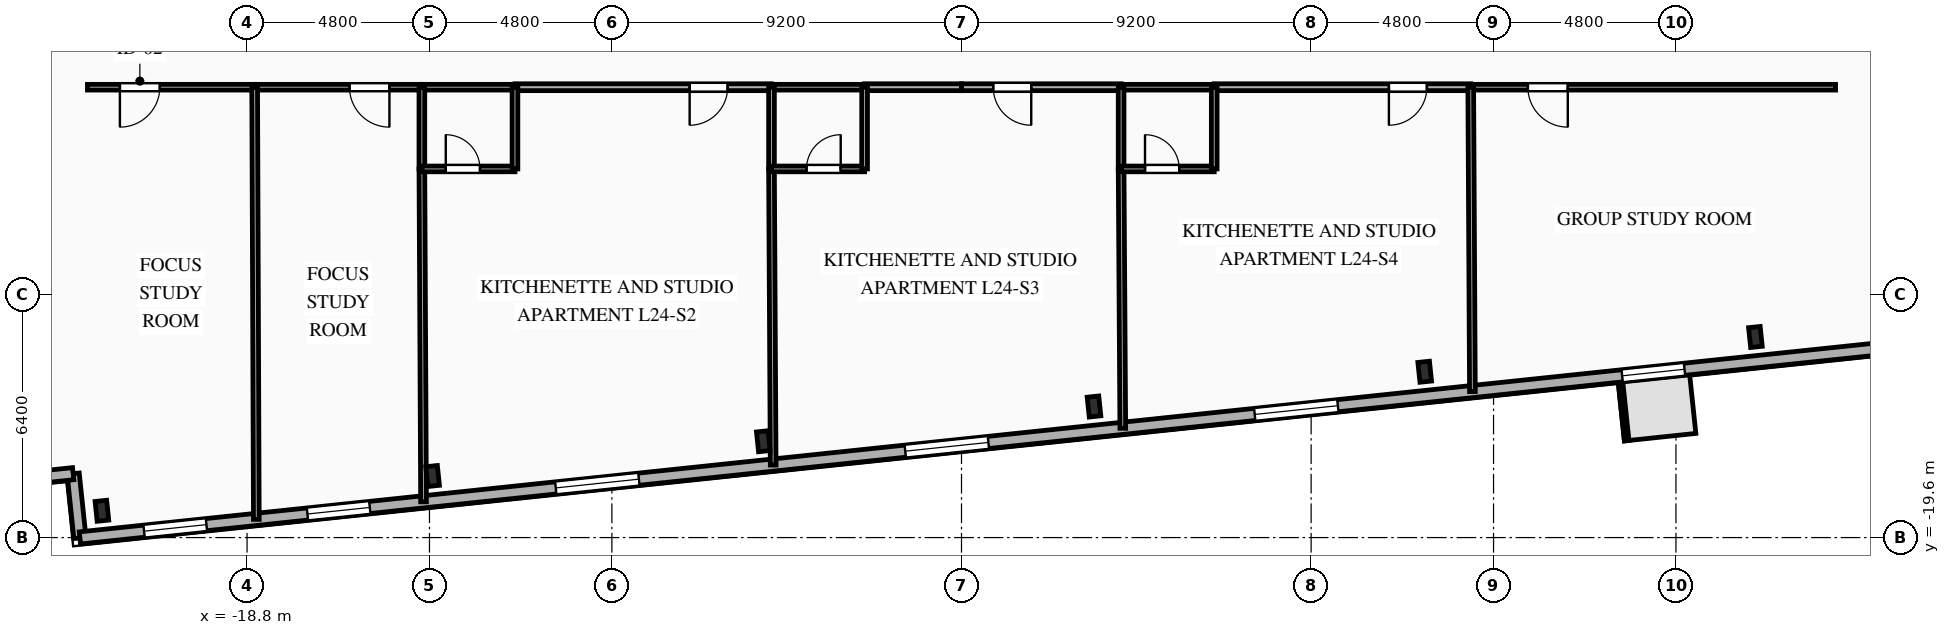
"""IFC4 building model, lengths in metres.
Left out: names, types, materials, properties, quantities, classifications, styles, units other than length and angle.
Written with IfcOpenShell. Run it as: python <this file> out.ifc"""

import sys

from ifc_helpers import new_model, si_unit, direction, frame, frame_2d, origin, origin_2d, place, context, subcontext, project, spatial, rectangle, i_section, extrude, element, fill, save


model = new_model("IFC4")
c1 = context("Model", 3, precision=1e-05, world=origin(), true_north=direction((0.0, 1.0)))
c2 = subcontext(c1, "Body", "Model", "MODEL_VIEW")
j1 = project(units=[si_unit("LENGTHUNIT", "METRE"), si_unit("PLANEANGLEUNIT", "RADIAN")], contexts=[c1])
p1 = place(None, origin())
s1 = spatial("IfcSite", under=j1, at=p1, CompositionType="ELEMENT")
p2 = place(p1, origin())
s2 = spatial("IfcBuilding", under=s1, at=p2, CompositionType="ELEMENT")
p3 = place(p2, frame((0.0, 0.0, 89.05)))
s3 = spatial("IfcBuildingStorey", under=s2, at=p3, CompositionType="ELEMENT", Elevation=89.05)
for number, where, z_axis, x_axis in (
    (1, (-22.619, -18.895, 0.0), (0.0, 0.0, 1.0), (0.995, 0.105, 0.0)),
    (2, (-13.917, -17.98, 0.0), (0.0, 0.0, 1.0), (0.995, 0.105, 0.0)),
    (3, (-5.215, -17.066, 0.0), (0.0, 0.0, 1.0), (0.995, 0.105, 0.0)),
    (4, (3.487, -16.151, 0.0), (0.0, 0.0, 1.0), (0.995, 0.105, 0.0)),
    (5, (12.189, -15.237, 0.0), (0.0, 0.0, 1.0), (0.995, 0.105, 0.0)),
    (6, (20.891, -14.322, 0.0), (0.0, 0.0, 1.0), (0.995, 0.105, 0.0)),
):
    element("IfcColumn", number, at=place(p3, frame(where, z_axis=z_axis, x_axis=x_axis)), inside=s3, PredefinedType="COLUMN", context=c2, shape_type="SweptSolid", body=[
        extrude(i_section(OverallWidth=0.306, OverallDepth=0.524, WebThickness=0.021, FlangeThickness=0.04, FilletRadius=0.027, at=origin_2d()), origin(), (0.0, 0.0, 1.0), 3.35),
    ])
for number, where, z_axis, x_axis in (
    (7, (-23.198, -19.609, 0.0), (0.0, 0.0, 1.0), (-0.105, 0.995, 0.0)),
    (8, (-23.376, -17.919, 0.0), (0.0, 0.0, 1.0), (-0.995, -0.105, 0.0)),
):
    element("IfcWall", number, at=place(p3, frame(where, z_axis=z_axis, x_axis=x_axis)), inside=s3, PredefinedType="SOLIDWALL", context=c2, shape_type="SweptSolid", body=[
        extrude(rectangle(XDim=1.7, YDim=0.32, at=frame_2d((0.85, 0.0))), origin(), (0.0, 0.0, 1.0), 3.045),
    ])
p4 = place(p3, frame((30.307, -13.986, 0.0), z_axis=(0.0, 0.0, 1.0), x_axis=(-0.994521628355, -0.104531003701, 0.0)))
e9 = element("IfcWall", 9, at=p4, inside=s3, PredefinedType="SOLIDWALL", context=c2, shape_type="SweptSolid", body=[
    extrude(rectangle(XDim=53.8, YDim=0.32, at=frame_2d((26.9, 0.0))), origin(), (0.0, 0.0, 1.0), 3.045),
])
p5 = place(p4, frame((11.344, 0.0, 0.85)))
e10 = element("IfcOpeningElement", 10, at=p5, cuts=e9, PredefinedType="OPENING", context=c2, shape_type="SweptSolid", body=[
    extrude(rectangle(XDim=1.65, YDim=1.85, at=frame_2d((0.825, 0.925))), frame((0.0, 0.17, 0.0), z_axis=(0.0, -1.0, 0.0), x_axis=(1.0, 0.0, 0.0)), (0.0, 0.0, 1.0), 0.34),
])
p6 = place(p4, frame((20.516, 0.0, 0.85)))
e11 = element("IfcOpeningElement", 11, at=p6, cuts=e9, PredefinedType="OPENING", context=c2, shape_type="SweptSolid", body=[
    extrude(rectangle(XDim=2.2, YDim=1.85, at=frame_2d((1.1, 0.925))), frame((0.0, 0.17, 0.0), z_axis=(0.0, -1.0, 0.0), x_axis=(1.0, 0.0, 0.0)), (0.0, 0.0, 1.0), 0.34),
])
p7 = place(p4, frame((29.763, 0.0, 0.85)))
e12 = element("IfcOpeningElement", 12, at=p7, cuts=e9, PredefinedType="OPENING", context=c2, shape_type="SweptSolid", body=[
    extrude(rectangle(XDim=2.2, YDim=1.85, at=frame_2d((1.1, 0.925))), frame((0.0, 0.17, 0.0), z_axis=(0.0, -1.0, 0.0), x_axis=(1.0, 0.0, 0.0)), (0.0, 0.0, 1.0), 0.34),
])
p8 = place(p4, frame((39.01, 0.0, 0.85)))
e13 = element("IfcOpeningElement", 13, at=p8, cuts=e9, PredefinedType="OPENING", context=c2, shape_type="SweptSolid", body=[
    extrude(rectangle(XDim=2.2, YDim=1.85, at=frame_2d((1.1, 0.925))), frame((0.0, 0.17, 0.0), z_axis=(0.0, -1.0, 0.0), x_axis=(1.0, 0.0, 0.0)), (0.0, 0.0, 1.0), 0.34),
])
p9 = place(p4, frame((46.13, 0.0, 0.85)))
e14 = element("IfcOpeningElement", 14, at=p9, cuts=e9, PredefinedType="OPENING", context=c2, shape_type="SweptSolid", body=[
    extrude(rectangle(XDim=1.65, YDim=1.85, at=frame_2d((0.825, 0.925))), frame((0.0, 0.17, 0.0), z_axis=(0.0, -1.0, 0.0), x_axis=(1.0, 0.0, 0.0)), (0.0, 0.0, 1.0), 0.34),
])
p10 = place(p4, frame((50.453, 0.0, 0.85)))
e15 = element("IfcOpeningElement", 15, at=p10, cuts=e9, PredefinedType="OPENING", context=c2, shape_type="SweptSolid", body=[
    extrude(rectangle(XDim=1.65, YDim=1.85, at=frame_2d((0.825, 0.925))), frame((0.0, 0.17, 0.0), z_axis=(0.0, -1.0, 0.0), x_axis=(1.0, 0.0, 0.0)), (0.0, 0.0, 1.0), 0.34),
])
p11 = place(p3, frame((-18.6, -7.75, 0.0), z_axis=(0.0, 0.0, 1.0), x_axis=(-1.0, 0.0, 0.0)))
e16 = element("IfcWall", 16, at=p11, inside=s3, PredefinedType="PARTITIONING", context=c2, shape_type="SweptSolid", body=[
    extrude(rectangle(XDim=4.4, YDim=0.15, at=frame_2d((2.2, 0.0))), origin(), (0.0, 0.0, 1.0), 3.045),
])
p12 = place(p11, frame((2.496, 0.0, 0.0)))
e17 = element("IfcOpeningElement", 17, at=p12, cuts=e16, PredefinedType="OPENING", context=c2, shape_type="SweptSolid", body=[
    extrude(rectangle(XDim=1.05, YDim=2.15, at=frame_2d((0.525, 1.075))), frame((0.0, 0.085, 0.0), z_axis=(0.0, -1.0, 0.0), x_axis=(1.0, 0.0, 0.0)), (0.0, 0.0, 1.0), 0.17),
])
p13 = place(p3, frame((-14.2, -7.75, 0.0), z_axis=(0.0, 0.0, 1.0), x_axis=(-1.0, 0.0, 0.0)))
e18 = element("IfcWall", 18, at=p13, inside=s3, PredefinedType="PARTITIONING", context=c2, shape_type="SweptSolid", body=[
    extrude(rectangle(XDim=4.4, YDim=0.15, at=frame_2d((2.2, 0.0))), origin(), (0.0, 0.0, 1.0), 3.045),
])
p14 = place(p13, frame((0.854, 0.0, 0.0)))
e19 = element("IfcOpeningElement", 19, at=p14, cuts=e18, PredefinedType="OPENING", context=c2, shape_type="SweptSolid", body=[
    extrude(rectangle(XDim=1.05, YDim=2.15, at=frame_2d((0.525, 1.075))), frame((0.0, 0.085, 0.0), z_axis=(0.0, -1.0, 0.0), x_axis=(1.0, 0.0, 0.0)), (0.0, 0.0, 1.0), 0.17),
])
p15 = place(p3, frame((-5.0, -7.75, 0.0), z_axis=(0.0, 0.0, 1.0), x_axis=(-1.0, 0.0, 0.0)))
e20 = element("IfcWall", 20, at=p15, inside=s3, PredefinedType="PARTITIONING", context=c2, shape_type="SweptSolid", body=[
    extrude(rectangle(XDim=6.75, YDim=0.18, at=frame_2d((3.375, 0.0))), origin(), (0.0, 0.0, 1.0), 3.045),
])
p16 = place(p15, frame((1.154, 0.0, 0.0)))
e21 = element("IfcOpeningElement", 21, at=p16, cuts=e20, PredefinedType="OPENING", context=c2, shape_type="SweptSolid", body=[
    extrude(rectangle(XDim=1.0, YDim=2.15, at=frame_2d((0.5, 1.075))), frame((0.0, 0.1, 0.0), z_axis=(0.0, -1.0, 0.0), x_axis=(1.0, 0.0, 0.0)), (0.0, 0.0, 1.0), 0.2),
])
p17 = place(p3, frame((-11.75, -7.75, 0.0), z_axis=(0.0, 0.0, 1.0), x_axis=(-1.0, 0.0, 0.0)))
e22 = element("IfcWall", 22, at=p17, inside=s3, PredefinedType="PLUMBINGWALL", context=c2, shape_type="SweptSolid", body=[
    extrude(rectangle(XDim=2.45, YDim=0.15, at=frame_2d((1.225, 0.0))), origin(), (0.0, 0.0, 1.0), 3.045),
])
p18 = place(p3, frame((0.0, -7.75, 0.0), z_axis=(0.0, 0.0, 1.0), x_axis=(-1.0, 0.0, 0.0)))
e23 = element("IfcWall", 23, at=p18, inside=s3, PredefinedType="PARTITIONING", context=c2, shape_type="SweptSolid", body=[
    extrude(rectangle(XDim=2.55, YDim=0.18, at=frame_2d((1.275, 0.0))), origin(), (0.0, 0.0, 1.0), 3.045),
])
p19 = place(p3, frame((-2.55, -7.75, 0.0), z_axis=(0.0, 0.0, 1.0), x_axis=(-1.0, 0.0, 0.0)))
e24 = element("IfcWall", 24, at=p19, inside=s3, PredefinedType="PLUMBINGWALL", context=c2, shape_type="SweptSolid", body=[
    extrude(rectangle(XDim=2.45, YDim=0.15, at=frame_2d((1.225, 0.0))), origin(), (0.0, 0.0, 1.0), 3.045),
])
p20 = place(p3, frame((4.2, -7.75, 0.0), z_axis=(0.0, 0.0, 1.0), x_axis=(-1.0, 0.0, 0.0)))
e25 = element("IfcWall", 25, at=p20, inside=s3, PredefinedType="PARTITIONING", context=c2, shape_type="SweptSolid", body=[
    extrude(rectangle(XDim=4.2, YDim=0.18, at=frame_2d((2.1, 0.0))), origin(), (0.0, 0.0, 1.0), 3.045),
])
p21 = place(p20, frame((2.365, 0.0, 0.0)))
e26 = element("IfcOpeningElement", 26, at=p21, cuts=e25, PredefinedType="OPENING", context=c2, shape_type="SweptSolid", body=[
    extrude(rectangle(XDim=1.0, YDim=2.15, at=frame_2d((0.5, 1.075))), frame((0.0, 0.1, 0.0), z_axis=(0.0, -1.0, 0.0), x_axis=(1.0, 0.0, 0.0)), (0.0, 0.0, 1.0), 0.2),
])
p22 = place(p3, frame((13.4, -7.75, 0.0), z_axis=(0.0, 0.0, 1.0), x_axis=(-1.0, 0.0, 0.0)))
e27 = element("IfcWall", 27, at=p22, inside=s3, PredefinedType="PARTITIONING", context=c2, shape_type="SweptSolid", body=[
    extrude(rectangle(XDim=6.75, YDim=0.18, at=frame_2d((3.375, 0.0))), origin(), (0.0, 0.0, 1.0), 3.045),
])
p23 = place(p22, frame((1.154, 0.0, 0.0)))
e28 = element("IfcOpeningElement", 28, at=p23, cuts=e27, PredefinedType="OPENING", context=c2, shape_type="SweptSolid", body=[
    extrude(rectangle(XDim=1.0, YDim=2.15, at=frame_2d((0.5, 1.075))), frame((0.0, 0.1, 0.0), z_axis=(0.0, -1.0, 0.0), x_axis=(1.0, 0.0, 0.0)), (0.0, 0.0, 1.0), 0.2),
])
p24 = place(p3, frame((6.65, -7.75, 0.0), z_axis=(0.0, 0.0, 1.0), x_axis=(-1.0, 0.0, 0.0)))
e29 = element("IfcWall", 29, at=p24, inside=s3, PredefinedType="PLUMBINGWALL", context=c2, shape_type="SweptSolid", body=[
    extrude(rectangle(XDim=2.45, YDim=0.15, at=frame_2d((1.225, 0.0))), origin(), (0.0, 0.0, 1.0), 3.045),
])
p25 = place(p3, frame((23.0, -7.75, 0.0), z_axis=(0.0, 0.0, 1.0), x_axis=(-1.0, 0.0, 0.0)))
e30 = element("IfcWall", 30, at=p25, inside=s3, PredefinedType="PARTITIONING", context=c2, shape_type="SweptSolid", body=[
    extrude(rectangle(XDim=9.6, YDim=0.15, at=frame_2d((4.8, 0.0))), origin(), (0.0, 0.0, 1.0), 3.045),
])
p26 = place(p25, frame((7.046, 0.0, 0.0)))
e31 = element("IfcOpeningElement", 31, at=p26, cuts=e30, PredefinedType="OPENING", context=c2, shape_type="SweptSolid", body=[
    extrude(rectangle(XDim=1.05, YDim=2.15, at=frame_2d((0.525, 1.075))), frame((0.0, 0.085, 0.0), z_axis=(0.0, -1.0, 0.0), x_axis=(1.0, 0.0, 0.0)), (0.0, 0.0, 1.0), 0.17),
])
p27 = place(p3, frame((-18.6, -7.75, 0.0), z_axis=(0.0, 0.0, 1.0), x_axis=(0.003864456523, -0.99999253296, 0.0)))
e32 = element("IfcWall", 32, at=p27, inside=s3, PredefinedType="PARTITIONING", context=c2, shape_type="SweptSolid", body=[
    extrude(rectangle(XDim=11.372, YDim=0.15, at=frame_2d((5.686, 0.0))), origin(), (0.0, 0.0, 1.0), 3.045),
])
p28 = place(p3, frame((-14.2, -9.9, 0.0), z_axis=(0.0, 0.0, 1.0), x_axis=(0.005017078758, -0.999987414381, 0.0)))
e33 = element("IfcWall", 33, at=p28, inside=s3, PredefinedType="PARTITIONING", context=c2, shape_type="SweptSolid", body=[
    extrude(rectangle(XDim=8.759, YDim=0.15, at=frame_2d((4.379, 0.0))), origin(), (0.0, 0.0, 1.0), 3.045),
])
p29 = place(p3, frame((-14.2, -7.75, 0.0), z_axis=(0.0, 0.0, 1.0), x_axis=(0.0, -1.0, 0.0)))
e34 = element("IfcWall", 34, at=p29, inside=s3, PredefinedType="PLUMBINGWALL", context=c2, shape_type="SweptSolid", body=[
    extrude(rectangle(XDim=2.15, YDim=0.15, at=frame_2d((1.075, 0.0))), origin(), (0.0, 0.0, 1.0), 3.045),
])
p30 = place(p3, frame((-14.2, -9.9, 0.0), z_axis=(0.0, 0.0, 1.0), x_axis=(1.0, 0.0, 0.0)))
e35 = element("IfcWall", 35, at=p30, inside=s3, PredefinedType="PLUMBINGWALL", context=c2, shape_type="SweptSolid", body=[
    extrude(rectangle(XDim=2.45, YDim=0.15, at=frame_2d((1.225, 0.0))), origin(), (0.0, 0.0, 1.0), 3.045),
])
p31 = place(p30, frame((0.629, 0.0, 0.0)))
e36 = element("IfcOpeningElement", 36, at=p31, cuts=e35, PredefinedType="OPENING", context=c2, shape_type="SweptSolid", body=[
    extrude(rectangle(XDim=0.9, YDim=2.1, at=frame_2d((0.45, 1.05))), frame((0.0, 0.085, 0.0), z_axis=(0.0, -1.0, 0.0), x_axis=(1.0, 0.0, 0.0)), (0.0, 0.0, 1.0), 0.17),
])
p32 = place(p3, frame((-11.75, -9.9, 0.0), z_axis=(0.0, 0.0, 1.0), x_axis=(0.0, 1.0, 0.0)))
e37 = element("IfcWall", 37, at=p32, inside=s3, PredefinedType="PLUMBINGWALL", context=c2, shape_type="SweptSolid", body=[
    extrude(rectangle(XDim=2.15, YDim=0.15, at=frame_2d((1.075, 0.0))), origin(), (0.0, 0.0, 1.0), 3.045),
])
p33 = place(p3, frame((-5.0, -9.9, 0.0), z_axis=(0.0, 0.0, 1.0), x_axis=(0.005639538101, -0.999984097679, 0.0)))
e38 = element("IfcWall", 38, at=p33, inside=s3, PredefinedType="PARTITIONING", context=c2, shape_type="SweptSolid", body=[
    extrude(rectangle(XDim=7.792, YDim=0.15, at=frame_2d((3.896, 0.0))), origin(), (0.0, 0.0, 1.0), 3.045),
])
p34 = place(p3, frame((-5.0, -7.75, 0.0), z_axis=(0.0, 0.0, 1.0), x_axis=(0.0, -1.0, 0.0)))
e39 = element("IfcWall", 39, at=p34, inside=s3, PredefinedType="PLUMBINGWALL", context=c2, shape_type="SweptSolid", body=[
    extrude(rectangle(XDim=2.15, YDim=0.15, at=frame_2d((1.075, 0.0))), origin(), (0.0, 0.0, 1.0), 3.045),
])
p35 = place(p3, frame((-5.0, -9.9, 0.0), z_axis=(0.0, 0.0, 1.0), x_axis=(1.0, 0.0, 0.0)))
e40 = element("IfcWall", 40, at=p35, inside=s3, PredefinedType="PLUMBINGWALL", context=c2, shape_type="SweptSolid", body=[
    extrude(rectangle(XDim=2.45, YDim=0.15, at=frame_2d((1.225, 0.0))), origin(), (0.0, 0.0, 1.0), 3.045),
])
p36 = place(p35, frame((0.921, 0.0, 0.0)))
e41 = element("IfcOpeningElement", 41, at=p36, cuts=e40, PredefinedType="OPENING", context=c2, shape_type="SweptSolid", body=[
    extrude(rectangle(XDim=0.9, YDim=2.1, at=frame_2d((0.45, 1.05))), frame((0.0, 0.085, 0.0), z_axis=(0.0, -1.0, 0.0), x_axis=(1.0, 0.0, 0.0)), (0.0, 0.0, 1.0), 0.17),
])
p37 = place(p3, frame((-2.55, -9.9, 0.0), z_axis=(0.0, 0.0, 1.0), x_axis=(0.0, 1.0, 0.0)))
e42 = element("IfcWall", 42, at=p37, inside=s3, PredefinedType="PLUMBINGWALL", context=c2, shape_type="SweptSolid", body=[
    extrude(rectangle(XDim=2.15, YDim=0.15, at=frame_2d((1.075, 0.0))), origin(), (0.0, 0.0, 1.0), 3.045),
])
p38 = place(p3, frame((4.2, -9.9, 0.0), z_axis=(0.0, 0.0, 1.0), x_axis=(0.00643855591, -0.999979272284, 0.0)))
e43 = element("IfcWall", 43, at=p38, inside=s3, PredefinedType="PARTITIONING", context=c2, shape_type="SweptSolid", body=[
    extrude(rectangle(XDim=6.825, YDim=0.15, at=frame_2d((3.413, 0.0))), origin(), (0.0, 0.0, 1.0), 3.045),
])
p39 = place(p3, frame((4.2, -7.75, 0.0), z_axis=(0.0, 0.0, 1.0), x_axis=(0.0, -1.0, 0.0)))
e44 = element("IfcWall", 44, at=p39, inside=s3, PredefinedType="PLUMBINGWALL", context=c2, shape_type="SweptSolid", body=[
    extrude(rectangle(XDim=2.15, YDim=0.15, at=frame_2d((1.075, 0.0))), origin(), (0.0, 0.0, 1.0), 3.045),
])
p40 = place(p3, frame((4.2, -9.9, 0.0), z_axis=(0.0, 0.0, 1.0), x_axis=(1.0, 0.0, 0.0)))
e45 = element("IfcWall", 45, at=p40, inside=s3, PredefinedType="PLUMBINGWALL", context=c2, shape_type="SweptSolid", body=[
    extrude(rectangle(XDim=2.45, YDim=0.15, at=frame_2d((1.225, 0.0))), origin(), (0.0, 0.0, 1.0), 3.045),
])
p41 = place(p40, frame((0.629, 0.0, 0.0)))
e46 = element("IfcOpeningElement", 46, at=p41, cuts=e45, PredefinedType="OPENING", context=c2, shape_type="SweptSolid", body=[
    extrude(rectangle(XDim=0.9, YDim=2.1, at=frame_2d((0.45, 1.05))), frame((0.0, 0.085, 0.0), z_axis=(0.0, -1.0, 0.0), x_axis=(1.0, 0.0, 0.0)), (0.0, 0.0, 1.0), 0.17),
])
p42 = place(p3, frame((6.65, -9.9, 0.0), z_axis=(0.0, 0.0, 1.0), x_axis=(0.0, 1.0, 0.0)))
e47 = element("IfcWall", 47, at=p42, inside=s3, PredefinedType="PLUMBINGWALL", context=c2, shape_type="SweptSolid", body=[
    extrude(rectangle(XDim=2.15, YDim=0.15, at=frame_2d((1.075, 0.0))), origin(), (0.0, 0.0, 1.0), 3.045),
])
p43 = place(p3, frame((13.4, -7.75, 0.0), z_axis=(0.0, 0.0, 1.0), x_axis=(0.005487554946, -0.999984943257, 0.0)))
e48 = element("IfcWall", 48, at=p43, inside=s3, PredefinedType="PARTITIONING", context=c2, shape_type="SweptSolid", body=[
    extrude(rectangle(XDim=8.008, YDim=0.15, at=frame_2d((4.004, 0.0))), origin(), (0.0, 0.0, 1.0), 3.045),
])
p44 = place(p5, origin())
e49 = element("IfcWindow", 49, at=p44, inside=s3, PartitioningType="SINGLE_PANEL", PredefinedType="WINDOW", context=c2, shape_type="SweptSolid", body=[
    extrude(rectangle(XDim=1.65, YDim=1.85, at=frame_2d((0.825, 0.925))), frame((0.0, 0.03, 0.0), z_axis=(0.0, -1.0, 0.0), x_axis=(1.0, 0.0, 0.0)), (0.0, 0.0, 1.0), 0.06),
])
fill(e10, e49)
p45 = place(p6, origin())
e50 = element("IfcWindow", 50, at=p45, inside=s3, PartitioningType="SINGLE_PANEL", PredefinedType="WINDOW", context=c2, shape_type="SweptSolid", body=[
    extrude(rectangle(XDim=2.2, YDim=1.85, at=frame_2d((1.1, 0.925))), frame((0.0, 0.03, 0.0), z_axis=(0.0, -1.0, 0.0), x_axis=(1.0, 0.0, 0.0)), (0.0, 0.0, 1.0), 0.06),
])
fill(e11, e50)
p46 = place(p7, origin())
e51 = element("IfcWindow", 51, at=p46, inside=s3, PartitioningType="SINGLE_PANEL", PredefinedType="WINDOW", context=c2, shape_type="SweptSolid", body=[
    extrude(rectangle(XDim=2.2, YDim=1.85, at=frame_2d((1.1, 0.925))), frame((0.0, 0.03, 0.0), z_axis=(0.0, -1.0, 0.0), x_axis=(1.0, 0.0, 0.0)), (0.0, 0.0, 1.0), 0.06),
])
fill(e12, e51)
p47 = place(p8, origin())
e52 = element("IfcWindow", 52, at=p47, inside=s3, PartitioningType="SINGLE_PANEL", PredefinedType="WINDOW", context=c2, shape_type="SweptSolid", body=[
    extrude(rectangle(XDim=2.2, YDim=1.85, at=frame_2d((1.1, 0.925))), frame((0.0, 0.03, 0.0), z_axis=(0.0, -1.0, 0.0), x_axis=(1.0, 0.0, 0.0)), (0.0, 0.0, 1.0), 0.06),
])
fill(e13, e52)
p48 = place(p9, origin())
e53 = element("IfcWindow", 53, at=p48, inside=s3, PartitioningType="SINGLE_PANEL", PredefinedType="WINDOW", context=c2, shape_type="SweptSolid", body=[
    extrude(rectangle(XDim=1.65, YDim=1.85, at=frame_2d((0.825, 0.925))), frame((0.0, 0.03, 0.0), z_axis=(0.0, -1.0, 0.0), x_axis=(1.0, 0.0, 0.0)), (0.0, 0.0, 1.0), 0.06),
])
fill(e14, e53)
p49 = place(p10, origin())
e54 = element("IfcWindow", 54, at=p49, inside=s3, PartitioningType="SINGLE_PANEL", PredefinedType="WINDOW", context=c2, shape_type="SweptSolid", body=[
    extrude(rectangle(XDim=1.65, YDim=1.85, at=frame_2d((0.825, 0.925))), frame((0.0, 0.03, 0.0), z_axis=(0.0, -1.0, 0.0), x_axis=(1.0, 0.0, 0.0)), (0.0, 0.0, 1.0), 0.06),
])
fill(e15, e54)
p50 = place(p12, origin())
e55 = element("IfcDoor", 55, at=p50, inside=s3, OperationType="SINGLE_SWING_RIGHT", PredefinedType="DOOR", context=c2, shape_type="SweptSolid", body=[
    extrude(rectangle(XDim=1.05, YDim=2.15, at=frame_2d((0.525, 1.075))), frame((0.0, 0.025, 0.0), z_axis=(0.0, -1.0, 0.0), x_axis=(1.0, 0.0, 0.0)), (0.0, 0.0, 1.0), 0.05),
])
fill(e17, e55)
p51 = place(p14, origin())
e56 = element("IfcDoor", 56, at=p51, inside=s3, OperationType="SINGLE_SWING_LEFT", PredefinedType="DOOR", context=c2, shape_type="SweptSolid", body=[
    extrude(rectangle(XDim=1.05, YDim=2.15, at=frame_2d((0.525, 1.075))), frame((0.0, 0.025, 0.0), z_axis=(0.0, -1.0, 0.0), x_axis=(1.0, 0.0, 0.0)), (0.0, 0.0, 1.0), 0.05),
])
fill(e19, e56)
p52 = place(p16, origin())
e57 = element("IfcDoor", 57, at=p52, inside=s3, OperationType="SINGLE_SWING_RIGHT", PredefinedType="DOOR", context=c2, shape_type="SweptSolid", body=[
    extrude(rectangle(XDim=1.0, YDim=2.15, at=frame_2d((0.5, 1.075))), frame((0.0, 0.025, 0.0), z_axis=(0.0, -1.0, 0.0), x_axis=(1.0, 0.0, 0.0)), (0.0, 0.0, 1.0), 0.05),
])
fill(e21, e57)
p53 = place(p21, origin())
e58 = element("IfcDoor", 58, at=p53, inside=s3, OperationType="SINGLE_SWING_LEFT", PredefinedType="DOOR", context=c2, shape_type="SweptSolid", body=[
    extrude(rectangle(XDim=1.0, YDim=2.15, at=frame_2d((0.5, 1.075))), frame((0.0, 0.025, 0.0), z_axis=(0.0, -1.0, 0.0), x_axis=(1.0, 0.0, 0.0)), (0.0, 0.0, 1.0), 0.05),
])
fill(e26, e58)
p54 = place(p23, origin())
e59 = element("IfcDoor", 59, at=p54, inside=s3, OperationType="SINGLE_SWING_RIGHT", PredefinedType="DOOR", context=c2, shape_type="SweptSolid", body=[
    extrude(rectangle(XDim=1.0, YDim=2.15, at=frame_2d((0.5, 1.075))), frame((0.0, 0.025, 0.0), z_axis=(0.0, -1.0, 0.0), x_axis=(1.0, 0.0, 0.0)), (0.0, 0.0, 1.0), 0.05),
])
fill(e28, e59)
p55 = place(p26, origin())
e60 = element("IfcDoor", 60, at=p55, inside=s3, OperationType="SINGLE_SWING_LEFT", PredefinedType="DOOR", context=c2, shape_type="SweptSolid", body=[
    extrude(rectangle(XDim=1.05, YDim=2.15, at=frame_2d((0.525, 1.075))), frame((0.0, 0.025, 0.0), z_axis=(0.0, -1.0, 0.0), x_axis=(1.0, 0.0, 0.0)), (0.0, 0.0, 1.0), 0.05),
])
fill(e31, e60)
p56 = place(p31, origin())
e61 = element("IfcDoor", 61, at=p56, inside=s3, OperationType="SINGLE_SWING_LEFT", PredefinedType="DOOR", context=c2, shape_type="SweptSolid", body=[
    extrude(rectangle(XDim=0.9, YDim=2.1, at=frame_2d((0.45, 1.05))), frame((0.0, 0.025, 0.0), z_axis=(0.0, -1.0, 0.0), x_axis=(1.0, 0.0, 0.0)), (0.0, 0.0, 1.0), 0.05),
])
fill(e36, e61)
p57 = place(p36, origin())
e62 = element("IfcDoor", 62, at=p57, inside=s3, OperationType="SINGLE_SWING_RIGHT", PredefinedType="DOOR", context=c2, shape_type="SweptSolid", body=[
    extrude(rectangle(XDim=0.9, YDim=2.1, at=frame_2d((0.45, 1.05))), frame((0.0, 0.025, 0.0), z_axis=(0.0, -1.0, 0.0), x_axis=(1.0, 0.0, 0.0)), (0.0, 0.0, 1.0), 0.05),
])
fill(e41, e62)
p58 = place(p41, origin())
e63 = element("IfcDoor", 63, at=p58, inside=s3, OperationType="SINGLE_SWING_LEFT", PredefinedType="DOOR", context=c2, shape_type="SweptSolid", body=[
    extrude(rectangle(XDim=0.9, YDim=2.1, at=frame_2d((0.45, 1.05))), frame((0.0, 0.025, 0.0), z_axis=(0.0, -1.0, 0.0), x_axis=(1.0, 0.0, 0.0)), (0.0, 0.0, 1.0), 0.05),
])
fill(e46, e63)
save(model, sys.argv[1])
